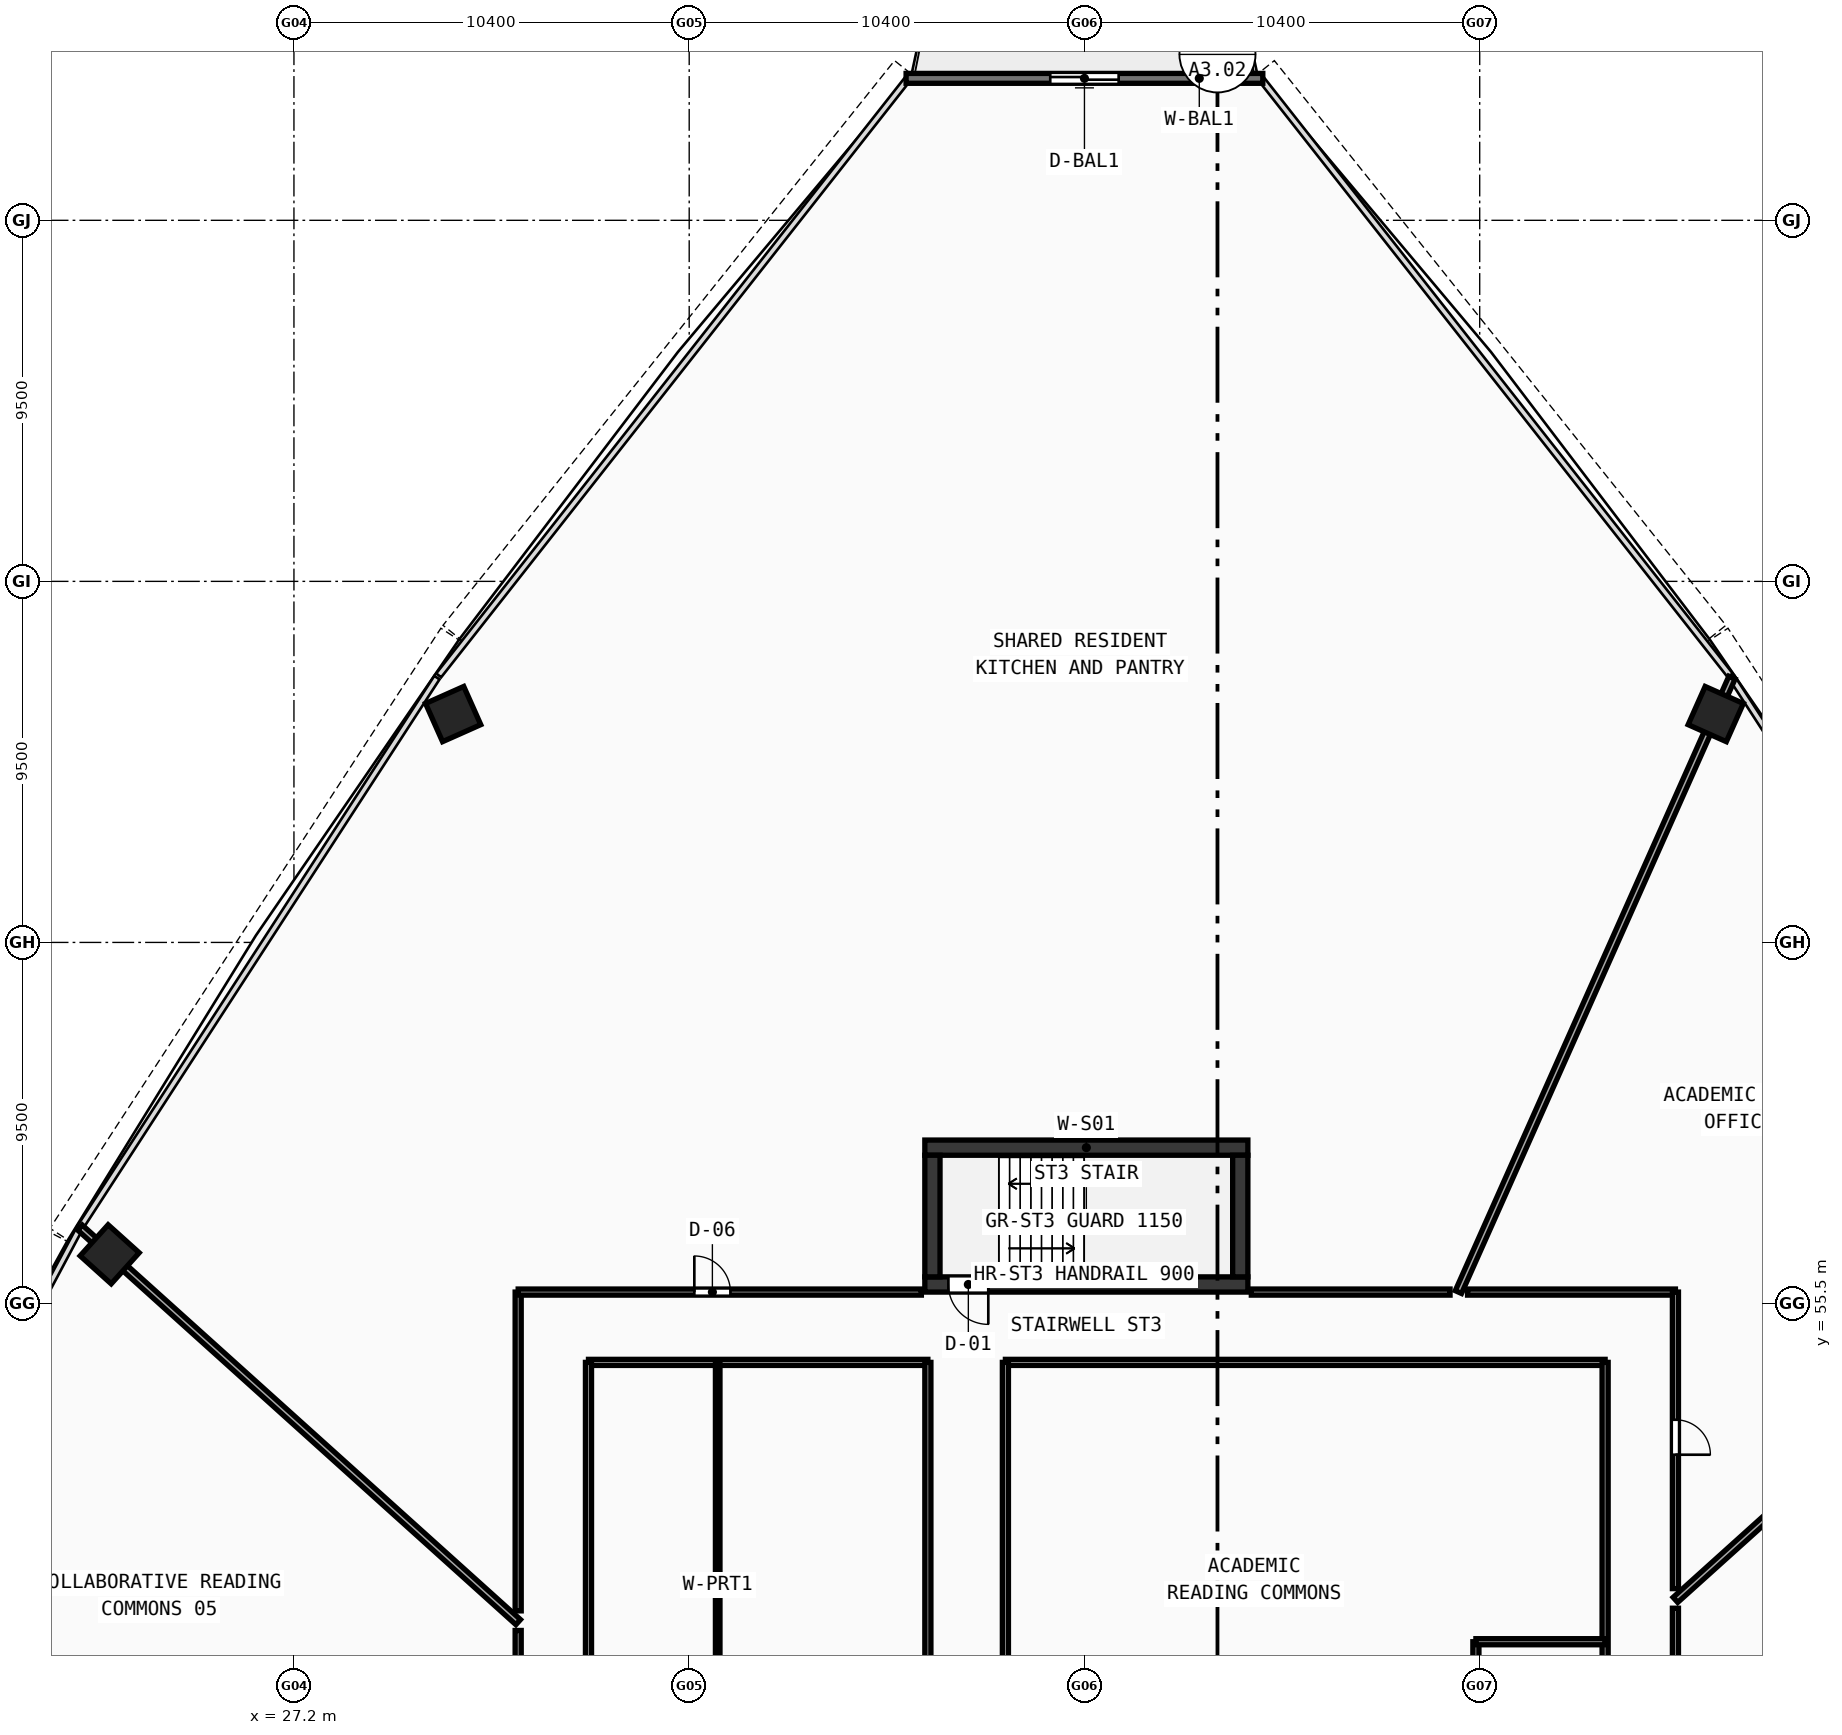
"""IFC4 building model, lengths in metres.
Left out: names, types, materials, properties, quantities, classifications, styles, units other than length and angle.
Written with IfcOpenShell. Run it as: python <this file> out.ifc"""

import sys

from ifc_helpers import new_model, si_unit, direction, frame, frame_2d, origin, origin_with_axes, origin_2d, place, context, subcontext, project, spatial, rectangle, hollow_rectangle, extrude, source, transform, mapped, element, fill, save


model = new_model("IFC4")
c1 = context("Model", 3, precision=1e-05, world=origin(), true_north=direction((0.0, 1.0)))
c2 = subcontext(c1, "Body", "Model", "MODEL_VIEW")
j1 = project(units=[si_unit("LENGTHUNIT", "METRE"), si_unit("PLANEANGLEUNIT", "RADIAN")], contexts=[c1])
p1 = place(None, origin())
s1 = spatial("IfcSite", under=j1, at=p1, CompositionType="ELEMENT")
p2 = place(p1, origin())
s2 = spatial("IfcBuilding", under=s1, at=p2, CompositionType="ELEMENT")
p3 = place(p2, frame((0.0, 0.0, 70.33)))
s3 = spatial("IfcBuildingStorey", under=s2, at=p3, CompositionType="ELEMENT", Elevation=70.33)
p4 = place(p3, frame((43.8, 59.6, 0.0), z_axis=(0.0, 0.0, 1.0), x_axis=(1.0, 0.0, 0.0)))
e1 = element("IfcWall", 1, at=p4, inside=s3, PredefinedType="SHEAR", context=c2, shape_type="SweptSolid", body=[
    extrude(rectangle(XDim=8.5, YDim=0.4, at=frame_2d((4.25, 0.0))), origin(), (0.0, 0.0, 1.0), 5.77),
])
p5 = place(p3, frame((43.8, 56.0, 0.0), z_axis=(0.0, 0.0, 1.0), x_axis=(1.0, 0.0, 0.0)))
e2 = element("IfcWall", 2, at=p5, inside=s3, PredefinedType="SHEAR", context=c2, shape_type="SweptSolid", body=[
    extrude(rectangle(XDim=8.5, YDim=0.4, at=frame_2d((4.25, 0.0))), origin(), (0.0, 0.0, 1.0), 5.77),
])
p6 = place(p5, frame((0.62, 0.0, 0.0)))
e3 = element("IfcOpeningElement", 3, at=p6, cuts=e2, PredefinedType="OPENING", context=c2, shape_type="SweptSolid", body=[
    extrude(rectangle(XDim=1.05, YDim=2.1, at=frame_2d((0.525, 1.05))), frame((0.0, 0.21, 0.0), z_axis=(0.0, -1.0, 0.0), x_axis=(1.0, 0.0, 0.0)), (0.0, 0.0, 1.0), 0.42),
])
for number, where, z_axis, x_axis in (
    (4, (44.0, 56.2, 0.0), (0.0, 0.0, 1.0), (0.0, 1.0, 0.0)),
    (5, (52.1, 56.2, 0.0), (0.0, 0.0, 1.0), (0.0, 1.0, 0.0)),
):
    element("IfcWall", number, at=place(p3, frame(where, z_axis=z_axis, x_axis=x_axis)), inside=s3, PredefinedType="SHEAR", context=c2, shape_type="SweptSolid", body=[
        extrude(rectangle(XDim=3.2, YDim=0.4, at=frame_2d((1.6, 0.0))), origin(), (0.0, 0.0, 1.0), 5.77),
    ])
m1 = source(origin(), c2, "Body", "SweptSolid", [
    extrude(hollow_rectangle(XDim=1.1, YDim=1.1, WallThickness=0.045, at=origin_2d()), origin(), (0.0, 0.0, 1.0), 6.03),
])
for number, where, z_axis, x_axis in (
    (6, (64.611, 71.009, -0.26), (0.0, 0.0, 1.0), (-0.914, 0.407, 0.0)),
    (7, (31.389, 71.009, -0.26), (0.0, 0.0, 1.0), (-0.914, -0.407, 0.0)),
    (8, (22.351, 56.794, -0.26), (0.0, 0.0, 1.0), (-0.669, -0.743, 0.0)),
):
    element("IfcColumn", number, at=place(p3, frame(where, z_axis=z_axis, x_axis=x_axis)), inside=s3, PredefinedType="COLUMN", context=c2, shape_type="MappedRepresentation", body=[
        mapped(m1, transform((0.0, 0.0, 0.0), scale=1.0)),
    ])
p7 = place(p3, frame((52.693, 87.735, 0.0), z_axis=(0.0, 0.0, 1.0), x_axis=(-1.0, 0.0, 0.0)))
e9 = element("IfcWall", 9, at=p7, inside=s3, PredefinedType="STANDARD", context=c2, shape_type="SweptSolid", body=[
    extrude(rectangle(XDim=9.386, YDim=0.26, at=frame_2d((4.693, 0.0))), origin(), (0.0, 0.0, 1.0), 5.77),
])
p8 = place(p7, frame((3.793, 0.0, 0.0)))
e10 = element("IfcOpeningElement", 10, at=p8, cuts=e9, PredefinedType="OPENING", context=c2, shape_type="SweptSolid", body=[
    extrude(rectangle(XDim=1.8, YDim=2.15, at=frame_2d((0.9, 1.075))), frame((0.0, 0.14, 0.0), z_axis=(0.0, -1.0, 0.0), x_axis=(1.0, 0.0, 0.0)), (0.0, 0.0, 1.0), 0.28),
])
p9 = place(p3, frame((34.95, 53.95, 0.0), z_axis=(0.0, 0.0, 1.0), x_axis=(1.0, 0.0, 0.0)))
e11 = element("IfcWall", 11, at=p9, inside=s3, PredefinedType="PARTITIONING", context=c2, shape_type="SweptSolid", body=[
    extrude(rectangle(XDim=8.93, YDim=0.16, at=frame_2d((4.465, 0.0))), origin(), (0.0, 0.0, 1.0), 2.42),
])
for number, where, z_axis, x_axis in (
    (12, (34.95, 42.25, 0.0), (0.0, 0.0, 1.0), (0.0, 1.0, 0.0)),
    (13, (43.88, 42.25, 0.0), (0.0, 0.0, 1.0), (0.0, 1.0, 0.0)),
):
    element("IfcWall", number, at=place(p3, frame(where, z_axis=z_axis, x_axis=x_axis)), inside=s3, PredefinedType="PARTITIONING", context=c2, shape_type="SweptSolid", body=[
        extrude(rectangle(XDim=11.7, YDim=0.16, at=frame_2d((5.85, 0.0))), origin(), (0.0, 0.0, 1.0), 2.42),
    ])
p10 = place(p3, frame((38.35, 42.25, 0.0), z_axis=(0.0, 0.0, 1.0), x_axis=(0.0, 1.0, 0.0)))
e14 = element("IfcWall", 14, at=p10, inside=s3, PredefinedType="PARTITIONING", context=c2, shape_type="SweptSolid", body=[
    extrude(rectangle(XDim=11.7, YDim=0.12, at=frame_2d((5.85, 0.0))), origin(), (0.0, 0.0, 1.0), 2.42),
])
p11 = place(p3, frame((45.92, 53.95, 0.0), z_axis=(0.0, 0.0, 1.0), x_axis=(1.0, 0.0, 0.0)))
e15 = element("IfcWall", 15, at=p11, inside=s3, PredefinedType="PARTITIONING", context=c2, shape_type="SweptSolid", body=[
    extrude(rectangle(XDim=15.78, YDim=0.16, at=frame_2d((7.89, 0.0))), origin(), (0.0, 0.0, 1.0), 2.42),
])
p12 = place(p3, frame((45.92, 42.25, 0.0), z_axis=(0.0, 0.0, 1.0), x_axis=(0.0, 1.0, 0.0)))
e16 = element("IfcWall", 16, at=p12, inside=s3, PredefinedType="PARTITIONING", context=c2, shape_type="SweptSolid", body=[
    extrude(rectangle(XDim=11.7, YDim=0.16, at=frame_2d((5.85, 0.0))), origin(), (0.0, 0.0, 1.0), 5.37),
])
p13 = place(p3, frame((61.7, 42.25, 0.0), z_axis=(0.0, 0.0, 1.0), x_axis=(0.0, 1.0, 0.0)))
e17 = element("IfcWall", 17, at=p13, inside=s3, PredefinedType="PARTITIONING", context=c2, shape_type="SweptSolid", body=[
    extrude(rectangle(XDim=11.7, YDim=0.16, at=frame_2d((5.85, 0.0))), origin(), (0.0, 0.0, 1.0), 2.42),
])
p14 = place(p3, frame((58.3, 42.25, 0.0), z_axis=(0.0, 0.0, 1.0), x_axis=(0.0, 1.0, 0.0)))
e18 = element("IfcWall", 18, at=p14, inside=s3, PredefinedType="PARTITIONING", context=c2, shape_type="SweptSolid", body=[
    extrude(rectangle(XDim=4.35, YDim=0.16, at=frame_2d((2.175, 0.0))), origin(), (0.0, 0.0, 1.0), 2.42),
])
p15 = place(p3, frame((58.3, 46.6, 0.0), z_axis=(0.0, 0.0, 1.0), x_axis=(1.0, 0.0, 0.0)))
e19 = element("IfcWall", 19, at=p15, inside=s3, PredefinedType="PARTITIONING", context=c2, shape_type="SweptSolid", body=[
    extrude(rectangle(XDim=3.4, YDim=0.16, at=frame_2d((1.7, 0.0))), origin(), (0.0, 0.0, 1.0), 2.42),
])
p16 = place(p3, frame((63.55, 47.701, 0.0), z_axis=(0.0, 0.0, 1.0), x_axis=(0.743144860423, 0.669130567547, 0.0)))
e20 = element("IfcWall", 20, at=p16, inside=s3, PredefinedType="PARTITIONING", context=c2, shape_type="SweptSolid", body=[
    extrude(rectangle(XDim=14.639, YDim=0.18, at=frame_2d((7.319, 0.0))), origin(), (0.0, 0.0, 1.0), 2.42),
])
p17 = place(p3, frame((57.84, 55.8, 0.0), z_axis=(0.0, 0.0, 1.0), x_axis=(0.406732277088, 0.913547401493, 0.0)))
e21 = element("IfcWall", 21, at=p17, inside=s3, PredefinedType="PARTITIONING", context=c2, shape_type="SweptSolid", body=[
    extrude(rectangle(XDim=17.698, YDim=0.18, at=frame_2d((8.849, 0.0))), origin(), (0.0, 0.0, 1.0), 2.42),
])
p18 = place(p3, frame((33.1, 47.116, 0.0), z_axis=(0.0, 0.0, 1.0), x_axis=(-0.743143105339, 0.669132516761, 0.0)))
e22 = element("IfcWall", 22, at=p18, inside=s3, PredefinedType="PARTITIONING", context=c2, shape_type="SweptSolid", body=[
    extrude(rectangle(XDim=15.514, YDim=0.18, at=frame_2d((7.757, 0.0))), origin(), (0.0, 0.0, 1.0), 2.42),
])
p19 = place(p3, frame((33.1, 38.773, 0.0), z_axis=(0.0, 0.0, 1.0), x_axis=(0.0, 1.0, 0.0)))
e23 = element("IfcWall", 23, at=p19, inside=s3, PredefinedType="PARTITIONING", context=c2, shape_type="SweptSolid", body=[
    extrude(rectangle(XDim=8.124, YDim=0.16, at=frame_2d((4.062, 0.0))), origin(), (0.0, 0.0, 1.0), 2.42),
])
p20 = place(p19, frame((3.581, 0.0, 0.0)))
e24 = element("IfcOpeningElement", 24, at=p20, cuts=e23, PredefinedType="OPENING", context=c2, shape_type="SweptSolid", body=[
    extrude(rectangle(XDim=0.95, YDim=2.1, at=frame_2d((0.475, 1.05))), frame((0.0, 0.09, 0.0), z_axis=(0.0, -1.0, 0.0), x_axis=(1.0, 0.0, 0.0)), (0.0, 0.0, 1.0), 0.18),
])
p21 = place(p3, frame((33.1, 47.412, 0.0), z_axis=(0.0, 0.0, 1.0), x_axis=(0.0, 1.0, 0.0)))
e25 = element("IfcWall", 25, at=p21, inside=s3, PredefinedType="PARTITIONING", context=c2, shape_type="SweptSolid", body=[
    extrude(rectangle(XDim=8.388, YDim=0.16, at=frame_2d((4.194, 0.0))), origin(), (0.0, 0.0, 1.0), 2.42),
])
p22 = place(p3, frame((33.1, 55.8, 0.0), z_axis=(0.0, 0.0, 1.0), x_axis=(1.0, 0.0, 0.0)))
e26 = element("IfcWall", 26, at=p22, inside=s3, PredefinedType="PARTITIONING", context=c2, shape_type="SweptSolid", body=[
    extrude(rectangle(XDim=10.609, YDim=0.16, at=frame_2d((5.304, 0.0))), origin(), (0.0, 0.0, 1.0), 2.42),
])
p23 = place(p22, frame((4.635, 0.0, 0.0)))
e27 = element("IfcOpeningElement", 27, at=p23, cuts=e26, PredefinedType="OPENING", context=c2, shape_type="SweptSolid", body=[
    extrude(rectangle(XDim=0.95, YDim=2.1, at=frame_2d((0.475, 1.05))), frame((0.0, 0.09, 0.0), z_axis=(0.0, -1.0, 0.0), x_axis=(1.0, 0.0, 0.0)), (0.0, 0.0, 1.0), 0.18),
])
p24 = place(p3, frame((52.391, 55.8, 0.0), z_axis=(0.0, 0.0, 1.0), x_axis=(1.0, 0.0, 0.0)))
e28 = element("IfcWall", 28, at=p24, inside=s3, PredefinedType="PARTITIONING", context=c2, shape_type="SweptSolid", body=[
    extrude(rectangle(XDim=5.229, YDim=0.16, at=frame_2d((2.614, 0.0))), origin(), (0.0, 0.0, 1.0), 2.42),
])
p25 = place(p3, frame((58.08, 55.8, 0.0), z_axis=(0.0, 0.0, 1.0), x_axis=(1.0, 0.0, 0.0)))
e29 = element("IfcWall", 29, at=p25, inside=s3, PredefinedType="PARTITIONING", context=c2, shape_type="SweptSolid", body=[
    extrude(rectangle(XDim=5.47, YDim=0.16, at=frame_2d((2.735, 0.0))), origin(), (0.0, 0.0, 1.0), 2.42),
])
p26 = place(p3, frame((63.55, 55.8, 0.0), z_axis=(0.0, 0.0, 1.0), x_axis=(0.0, -1.0, 0.0)))
e30 = element("IfcWall", 30, at=p26, inside=s3, PredefinedType="PARTITIONING", context=c2, shape_type="SweptSolid", body=[
    extrude(rectangle(XDim=7.803, YDim=0.16, at=frame_2d((3.901, 0.0))), origin(), (0.0, 0.0, 1.0), 2.42),
])
p27 = place(p26, frame((3.359, 0.0, 0.0)))
e31 = element("IfcOpeningElement", 31, at=p27, cuts=e30, PredefinedType="OPENING", context=c2, shape_type="SweptSolid", body=[
    extrude(rectangle(XDim=0.92, YDim=2.1, at=frame_2d((0.46, 1.05))), frame((0.0, 0.09, 0.0), z_axis=(0.0, -1.0, 0.0), x_axis=(1.0, 0.0, 0.0)), (0.0, 0.0, 1.0), 0.18),
])
p28 = place(p3, frame((63.55, 47.482, 0.0), z_axis=(0.0, 0.0, 1.0), x_axis=(0.0, -1.0, 0.0)))
e32 = element("IfcWall", 32, at=p28, inside=s3, PredefinedType="PARTITIONING", context=c2, shape_type="SweptSolid", body=[
    extrude(rectangle(XDim=8.498, YDim=0.16, at=frame_2d((4.249, 0.0))), origin(), (0.0, 0.0, 1.0), 2.42),
])
p29 = place(p28, frame((3.795, 0.0, 0.0)))
e33 = element("IfcOpeningElement", 33, at=p29, cuts=e32, PredefinedType="OPENING", context=c2, shape_type="SweptSolid", body=[
    extrude(rectangle(XDim=0.92, YDim=2.1, at=frame_2d((0.46, 1.05))), frame((0.0, 0.09, 0.0), z_axis=(0.0, -1.0, 0.0), x_axis=(1.0, 0.0, 0.0)), (0.0, 0.0, 1.0), 0.18),
])
m2 = source(origin(), c2, "Body", "SweptSolid", [
    extrude(rectangle(XDim=1.8, YDim=2.15, at=frame_2d((0.9, 1.075))), frame((0.0, 0.025, 0.0), z_axis=(0.0, -1.0, 0.0), x_axis=(1.0, 0.0, 0.0)), (0.0, 0.0, 1.0), 0.05),
])
p30 = place(p8, origin_with_axes())
e34 = element("IfcDoor", 34, at=p30, inside=s3, OperationType="DOUBLE_DOOR_SLIDING", PredefinedType="DOOR", context=c2, shape_type="MappedRepresentation", body=[
    mapped(m2, transform((0.0, 0.0, 0.0), scale=1.0)),
])
fill(e10, e34)
m3 = source(origin(), c2, "Body", "SweptSolid", [
    extrude(rectangle(XDim=1.05, YDim=2.1, at=frame_2d((0.525, 1.05))), frame((0.0, 0.025, 0.0), z_axis=(0.0, -1.0, 0.0), x_axis=(1.0, 0.0, 0.0)), (0.0, 0.0, 1.0), 0.05),
])
p31 = place(p6, frame((1.05, 0.0, 0.0), z_axis=(0.0, 0.0, 1.0), x_axis=(-1.0, 0.0, 0.0)))
e35 = element("IfcDoor", 35, at=p31, inside=s3, OperationType="SINGLE_SWING_LEFT", PredefinedType="DOOR", context=c2, shape_type="MappedRepresentation", body=[
    mapped(m3, transform((0.0, 0.0, 0.0), scale=1.0)),
])
fill(e3, e35)
m4 = source(origin(), c2, "Body", "SweptSolid", [
    extrude(rectangle(XDim=0.92, YDim=2.1, at=frame_2d((0.46, 1.05))), frame((0.0, 0.025, 0.0), z_axis=(0.0, -1.0, 0.0), x_axis=(1.0, 0.0, 0.0)), (0.0, 0.0, 1.0), 0.05),
])
p32 = place(p27, origin_with_axes())
e36 = element("IfcDoor", 36, at=p32, inside=s3, OperationType="SINGLE_SWING_RIGHT", PredefinedType="DOOR", context=c2, shape_type="MappedRepresentation", body=[
    mapped(m4, transform((0.0, 0.0, 0.0), scale=1.0)),
])
fill(e31, e36)
m5 = source(origin(), c2, "Body", "SweptSolid", [
    extrude(rectangle(XDim=0.95, YDim=2.1, at=frame_2d((0.475, 1.05))), frame((0.0, 0.025, 0.0), z_axis=(0.0, -1.0, 0.0), x_axis=(1.0, 0.0, 0.0)), (0.0, 0.0, 1.0), 0.05),
])
p33 = place(p23, origin_with_axes())
e37 = element("IfcDoor", 37, at=p33, inside=s3, OperationType="SINGLE_SWING_LEFT", PredefinedType="DOOR", context=c2, shape_type="MappedRepresentation", body=[
    mapped(m5, transform((0.0, 0.0, 0.0), scale=1.0)),
])
fill(e27, e37)
save(model, sys.argv[1])
